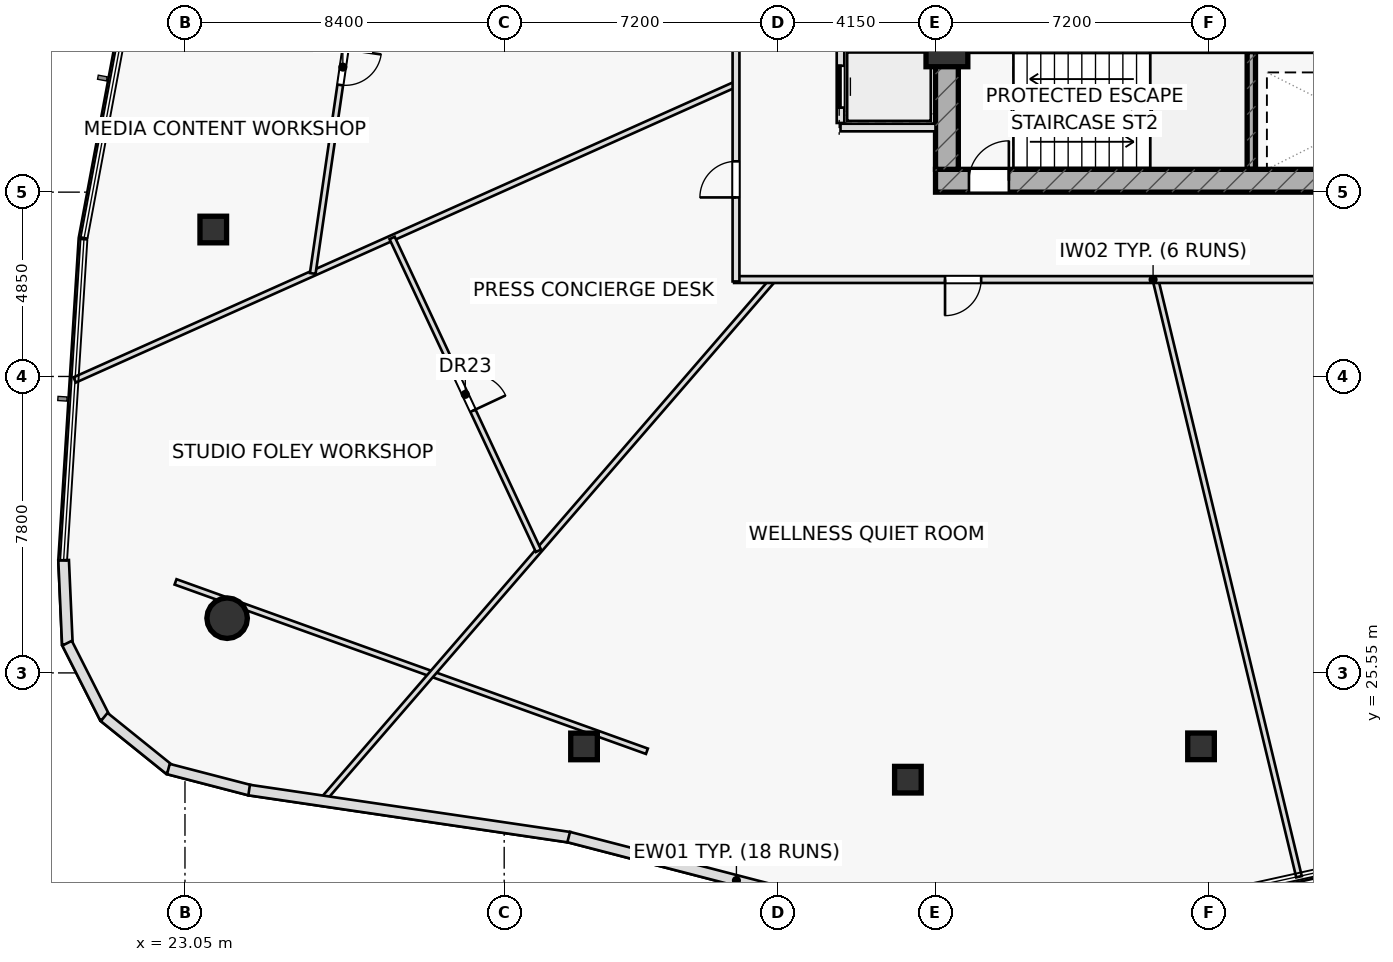
"""IFC4 building model, lengths in metres.
Left out: names, types, materials, properties, quantities, classifications, styles, units other than length and angle.
Written with IfcOpenShell. Run it as: python <this file> out.ifc"""

import sys

from ifc_helpers import new_model, si_unit, direction, frame, frame_2d, origin, origin_2d, place, context, subcontext, project, spatial, rectangle, hollow_rectangle, hollow_circle, extrude, element, fill, save


model = new_model("IFC4")
c1 = context("Model", 3, precision=1e-05, world=origin(), true_north=direction((0.0, 1.0)))
c2 = subcontext(c1, "Body", "Model", "MODEL_VIEW")
j1 = project(units=[si_unit("LENGTHUNIT", "METRE"), si_unit("PLANEANGLEUNIT", "RADIAN")], contexts=[c1])
p1 = place(None, origin())
s1 = spatial("IfcSite", under=j1, at=p1, CompositionType="ELEMENT")
p2 = place(p1, origin())
s2 = spatial("IfcBuilding", under=s1, at=p2, CompositionType="ELEMENT")
p3 = place(p2, frame((0.0, 0.0, 62.7)))
s3 = spatial("IfcBuildingStorey", under=s2, at=p3, CompositionType="ELEMENT", Elevation=62.7)
p4 = place(p3, frame((51.11, 38.8, 0.0), z_axis=(0.0, 0.0, 1.0), x_axis=(0.0, 1.0, 0.0)))
e1 = element("IfcWall", 1, at=p4, inside=s3, PredefinedType="SHEAR", context=c2, shape_type="SweptSolid", body=[
    extrude(rectangle(XDim=3.1, YDim=0.22, at=frame_2d((1.55, 0.0))), origin(), (0.0, 0.0, 1.0), 3.6),
])
p5 = place(p3, frame((42.8, 38.5, 0.0), z_axis=(0.0, 0.0, 1.0), x_axis=(1.0, 0.0, 0.0)))
e2 = element("IfcWall", 2, at=p5, inside=s3, PredefinedType="SHEAR", context=c2, shape_type="SweptSolid", body=[
    extrude(rectangle(XDim=14.4, YDim=0.6, at=frame_2d((7.2, 0.0))), origin(), (0.0, 0.0, 1.0), 3.6),
])
p6 = place(p5, frame((0.88, 0.0, 0.0)))
e3 = element("IfcOpeningElement", 3, at=p6, cuts=e2, PredefinedType="OPENING", context=c2, shape_type="SweptSolid", body=[
    extrude(rectangle(XDim=1.05, YDim=2.2, at=frame_2d((0.525, 1.1))), frame((0.0, 0.31, 0.0), z_axis=(0.0, -1.0, 0.0), x_axis=(1.0, 0.0, 0.0)), (0.0, 0.0, 1.0), 0.62),
])
p7 = place(p3, frame((43.1, 38.8, 0.0), z_axis=(0.0, 0.0, 1.0), x_axis=(0.0, 1.0, 0.0)))
e4 = element("IfcWall", 4, at=p7, inside=s3, PredefinedType="SHEAR", context=c2, shape_type="SweptSolid", body=[
    extrude(rectangle(XDim=12.4, YDim=0.6, at=frame_2d((6.2, 0.0))), origin(), (0.0, 0.0, 1.0), 3.6),
])
p8 = place(p3, frame((43.1, 42.05, 0.0), z_axis=(0.0, 0.0, 1.0), x_axis=(1.0, 0.0, 0.0)))
e5 = element("IfcColumn", 5, at=p8, inside=s3, PredefinedType="COLUMN", context=c2, shape_type="SweptSolid", body=[
    extrude(rectangle(XDim=1.1, YDim=1.1, at=origin_2d()), origin(), (0.0, 0.0, 1.0), 3.6),
])
p9 = place(p3, frame((23.795, 37.216, 0.0), z_axis=(0.0, 0.0, 1.0), x_axis=(1.0, 0.0, 0.0)))
e6 = element("IfcColumn", 6, at=p9, inside=s3, PredefinedType="COLUMN", context=c2, shape_type="SweptSolid", body=[
    extrude(hollow_rectangle(XDim=0.7, YDim=0.7, WallThickness=0.04, at=origin_2d()), origin(), (0.0, 0.0, 1.0), 3.6),
])
p10 = place(p3, frame((24.159, 26.99, 0.0), z_axis=(0.0, 0.0, 1.0), x_axis=(1.0, 0.0, 0.0)))
e7 = element("IfcColumn", 7, at=p10, inside=s3, PredefinedType="COLUMN", context=c2, shape_type="SweptSolid", body=[
    extrude(hollow_circle(Radius=0.533, WallThickness=0.045, at=origin_2d()), origin(), (0.0, 0.0, 1.0), 3.6),
])
for number, where, z_axis, x_axis in (
    (8, (33.551, 23.615, 0.0), (0.0, 0.0, 1.0), (1.0, 0.0, 0.0)),
    (9, (42.073, 22.74, 0.0), (0.0, 0.0, 1.0), (1.0, 0.0, 0.0)),
    (10, (49.787, 23.618, 0.0), (0.0, 0.0, 1.0), (1.0, 0.0, 0.0)),
):
    element("IfcColumn", number, at=place(p3, frame(where, z_axis=z_axis, x_axis=x_axis)), inside=s3, PredefinedType="COLUMN", context=c2, shape_type="SweptSolid", body=[
        extrude(hollow_rectangle(XDim=0.7, YDim=0.7, WallThickness=0.04, at=origin_2d()), origin(), (0.0, 0.0, 1.0), 3.6),
    ])
p11 = place(p3, frame((40.3, 39.9, 0.0), z_axis=(0.0, 0.0, 1.0), x_axis=(1.0, 0.0, 0.0)))
e11 = element("IfcWall", 11, at=p11, inside=s3, PredefinedType="PARTITIONING", context=c2, shape_type="SweptSolid", body=[
    extrude(rectangle(XDim=2.5, YDim=0.2, at=frame_2d((1.25, 0.0))), origin(), (0.0, 0.0, 1.0), 3.6),
])
p12 = place(p3, frame((22.802, 27.945, 0.0), z_axis=(0.0, 0.0, 1.0), x_axis=(0.941102349209, -0.338121824662, 0.0)))
e12 = element("IfcWall", 12, at=p12, inside=s3, PredefinedType="PARTITIONING", context=c2, shape_type="SweptSolid", body=[
    extrude(rectangle(XDim=13.18, YDim=0.15, at=frame_2d((6.59, 0.0))), origin(), (0.0, 0.0, 1.0), 2.975),
])
p13 = place(p3, frame((37.55, 41.042, 0.0), z_axis=(0.0, 0.0, 1.0), x_axis=(-0.912860583098, -0.408271424211, 0.0)))
e13 = element("IfcWall", 13, at=p13, inside=s3, PredefinedType="PARTITIONING", context=c2, shape_type="SweptSolid", body=[
    extrude(rectangle(XDim=19.064, YDim=0.15, at=frame_2d((9.532, 0.0))), origin(), (0.0, 0.0, 1.0), 2.975),
])
p14 = place(p3, frame((38.526, 35.9, 0.0), z_axis=(0.0, 0.0, 1.0), x_axis=(-0.654326006544, -0.75621258728, 0.0)))
e14 = element("IfcWall", 14, at=p14, inside=s3, PredefinedType="PARTITIONING", context=c2, shape_type="SweptSolid", body=[
    extrude(rectangle(XDim=18.149, YDim=0.15, at=frame_2d((9.074, 0.0))), origin(), (0.0, 0.0, 1.0), 2.975),
])
p15 = place(p3, frame((48.588, 35.9, 0.0), z_axis=(0.0, 0.0, 1.0), x_axis=(0.233735732541, -0.972300163187, 0.0)))
e15 = element("IfcWall", 15, at=p15, inside=s3, PredefinedType="PARTITIONING", context=c2, shape_type="SweptSolid", body=[
    extrude(rectangle(XDim=16.162, YDim=0.15, at=frame_2d((8.081, 0.0))), origin(), (0.0, 0.0, 1.0), 3.025),
])
p16 = place(p3, frame((27.996, 46.919, 0.0), z_axis=(0.0, 0.0, 1.0), x_axis=(-0.144345470149, -0.989527354472, 0.0)))
e16 = element("IfcWall", 16, at=p16, inside=s3, PredefinedType="PARTITIONING", context=c2, shape_type="SweptSolid", body=[
    extrude(rectangle(XDim=10.974, YDim=0.15, at=frame_2d((5.487, 0.0))), origin(), (0.0, 0.0, 1.0), 2.975),
])
p17 = place(p16, frame((5.012, 0.0, 0.0)))
e17 = element("IfcOpeningElement", 17, at=p17, cuts=e16, PredefinedType="OPENING", context=c2, shape_type="SweptSolid", body=[
    extrude(rectangle(XDim=0.95, YDim=2.05, at=frame_2d((0.475, 1.025))), frame((0.0, 0.085, 0.0), z_axis=(0.0, -1.0, 0.0), x_axis=(1.0, 0.0, 0.0)), (0.0, 0.0, 1.0), 0.17),
])
p18 = place(p3, frame((28.501, 36.995, 0.0), z_axis=(0.0, 0.0, 1.0), x_axis=(0.423698619108, -0.905803223756, 0.0)))
e18 = element("IfcWall", 18, at=p18, inside=s3, PredefinedType="PARTITIONING", context=c2, shape_type="SweptSolid", body=[
    extrude(rectangle(XDim=9.087, YDim=0.15, at=frame_2d((4.544, 0.0))), origin(), (0.0, 0.0, 1.0), 2.975),
])
p19 = place(p18, frame((4.069, 0.0, 0.0)))
e19 = element("IfcOpeningElement", 19, at=p19, cuts=e18, PredefinedType="OPENING", context=c2, shape_type="SweptSolid", body=[
    extrude(rectangle(XDim=0.95, YDim=2.05, at=frame_2d((0.475, 1.025))), frame((0.0, 0.085, 0.0), z_axis=(0.0, -1.0, 0.0), x_axis=(1.0, 0.0, 0.0)), (0.0, 0.0, 1.0), 0.17),
])
p20 = place(p3, frame((59.55, 35.9, 0.0), z_axis=(0.0, 0.0, 1.0), x_axis=(-1.0, 0.0, 0.0)))
e20 = element("IfcWall", 20, at=p20, inside=s3, PredefinedType="PARTITIONING", context=c2, shape_type="SweptSolid", body=[
    extrude(rectangle(XDim=22.05, YDim=0.18, at=frame_2d((11.025, 0.0))), origin(), (0.0, 0.0, 1.0), 2.975),
])
p21 = place(p20, frame((5.11, 0.0, 0.0)))
e21 = element("IfcOpeningElement", 21, at=p21, cuts=e20, PredefinedType="OPENING", context=c2, shape_type="SweptSolid", body=[
    extrude(rectangle(XDim=0.95, YDim=2.05, at=frame_2d((0.475, 1.025))), frame((0.0, 0.1, 0.0), z_axis=(0.0, -1.0, 0.0), x_axis=(1.0, 0.0, 0.0)), (0.0, 0.0, 1.0), 0.2),
])
p22 = place(p20, frame((15.55, 0.0, 0.0)))
e22 = element("IfcOpeningElement", 22, at=p22, cuts=e20, PredefinedType="OPENING", context=c2, shape_type="SweptSolid", body=[
    extrude(rectangle(XDim=0.95, YDim=2.05, at=frame_2d((0.475, 1.025))), frame((0.0, 0.1, 0.0), z_axis=(0.0, -1.0, 0.0), x_axis=(1.0, 0.0, 0.0)), (0.0, 0.0, 1.0), 0.2),
])
p23 = place(p3, frame((37.55, 35.85, 0.0), z_axis=(0.0, 0.0, 1.0), x_axis=(0.0, 1.0, 0.0)))
e23 = element("IfcWall", 23, at=p23, inside=s3, PredefinedType="PARTITIONING", context=c2, shape_type="SweptSolid", body=[
    extrude(rectangle(XDim=12.65, YDim=0.18, at=frame_2d((6.325, 0.0))), origin(), (0.0, 0.0, 1.0), 2.975),
])
p24 = place(p23, frame((2.211, 0.0, 0.0)))
e24 = element("IfcOpeningElement", 24, at=p24, cuts=e23, PredefinedType="OPENING", context=c2, shape_type="SweptSolid", body=[
    extrude(rectangle(XDim=0.95, YDim=2.05, at=frame_2d((0.475, 1.025))), frame((0.0, 0.1, 0.0), z_axis=(0.0, -1.0, 0.0), x_axis=(1.0, 0.0, 0.0)), (0.0, 0.0, 1.0), 0.2),
])
p25 = place(p23, frame((7.143, 0.0, 0.0)))
e25 = element("IfcOpeningElement", 25, at=p25, cuts=e23, PredefinedType="OPENING", context=c2, shape_type="SweptSolid", body=[
    extrude(rectangle(XDim=0.95, YDim=2.05, at=frame_2d((0.475, 1.025))), frame((0.0, 0.1, 0.0), z_axis=(0.0, -1.0, 0.0), x_axis=(1.0, 0.0, 0.0)), (0.0, 0.0, 1.0), 0.2),
])
p26 = place(p23, frame((10.774, 0.0, 0.0)))
e26 = element("IfcOpeningElement", 26, at=p26, cuts=e23, PredefinedType="OPENING", context=c2, shape_type="SweptSolid", body=[
    extrude(rectangle(XDim=0.95, YDim=2.05, at=frame_2d((0.475, 1.025))), frame((0.0, 0.1, 0.0), z_axis=(0.0, -1.0, 0.0), x_axis=(1.0, 0.0, 0.0)), (0.0, 0.0, 1.0), 0.2),
])
p27 = place(p3, frame((19.857, 28.515, 0.0), z_axis=(0.0, 0.0, 1.0), x_axis=(0.044432401991, -0.999012393143, 0.0)))
e27 = element("IfcWall", 27, at=p27, inside=s3, PredefinedType="STANDARD", context=c2, shape_type="SweptSolid", body=[
    extrude(rectangle(XDim=2.214, YDim=0.28, at=frame_2d((1.107, 0.0))), origin(), (0.0, 0.0, 1.0), 3.6),
])
for number, where, z_axis, x_axis in (
    (28, (19.948, 26.331, 0.0), (0.0, 0.0, 1.0), (0.452, -0.892, 0.0)),
    (29, (20.924, 24.389, 0.0), (0.0, 0.0, 1.0), (0.779, -0.627, 0.0)),
):
    element("IfcWall", number, at=place(p3, frame(where, z_axis=z_axis, x_axis=x_axis)), inside=s3, PredefinedType="STANDARD", context=c2, shape_type="SweptSolid", body=[
        extrude(rectangle(XDim=2.203, YDim=0.28, at=frame_2d((1.101, 0.0))), origin(), (0.0, 0.0, 1.0), 3.6),
    ])
p28 = place(p3, frame((22.613, 23.021, 0.0), z_axis=(0.0, 0.0, 1.0), x_axis=(0.967909001879, -0.251300943258, 0.0)))
e30 = element("IfcWall", 30, at=p28, inside=s3, PredefinedType="STANDARD", context=c2, shape_type="SweptSolid", body=[
    extrude(rectangle(XDim=2.226, YDim=0.28, at=frame_2d((1.113, 0.0))), origin(), (0.0, 0.0, 1.0), 3.6),
])
p29 = place(p3, frame((24.738, 22.467, 0.0), z_axis=(0.0, 0.0, 1.0), x_axis=(0.989330031973, -0.145691756242, 0.0)))
e31 = element("IfcWall", 31, at=p29, inside=s3, PredefinedType="STANDARD", context=c2, shape_type="SweptSolid", body=[
    extrude(rectangle(XDim=8.53, YDim=0.28, at=frame_2d((4.265, 0.0))), origin(), (0.0, 0.0, 1.0), 3.6),
])
p30 = place(p3, frame((33.147, 21.231, 0.0), z_axis=(0.0, 0.0, 1.0), x_axis=(0.968060465232, -0.250716843579, 0.0)))
e32 = element("IfcWall", 32, at=p30, inside=s3, PredefinedType="STANDARD", context=c2, shape_type="SweptSolid", body=[
    extrude(rectangle(XDim=9.118, YDim=0.28, at=frame_2d((4.559, 0.0))), origin(), (0.0, 0.0, 1.0), 3.6),
])
p31 = place(p3, frame((40.3, 40.02, 0.0), z_axis=(0.0, 0.0, 1.0), x_axis=(0.0, 1.0, 0.0)))
e33 = element("IfcWall", 33, at=p31, inside=s3, PredefinedType="PARTITIONING", context=c2, shape_type="SweptSolid", body=[
    extrude(rectangle(XDim=8.21, YDim=0.2, at=frame_2d((4.105, 0.0))), origin(), (0.0, 0.0, 1.0), 3.6),
])
p32 = place(p31, frame((0.405, 0.0, 0.0)))
e34 = element("IfcOpeningElement", 34, at=p32, cuts=e33, PredefinedType="OPENING", context=c2, shape_type="SweptSolid", body=[
    extrude(rectangle(XDim=1.1, YDim=2.15, at=frame_2d((0.55, 1.075))), frame((0.0, 0.11, 0.0), z_axis=(0.0, -1.0, 0.0), x_axis=(1.0, 0.0, 0.0)), (0.0, 0.0, 1.0), 0.22),
])
p33 = place(p31, frame((2.505, 0.0, 0.0)))
e35 = element("IfcOpeningElement", 35, at=p33, cuts=e33, PredefinedType="OPENING", context=c2, shape_type="SweptSolid", body=[
    extrude(rectangle(XDim=1.1, YDim=2.15, at=frame_2d((0.55, 1.075))), frame((0.0, 0.11, 0.0), z_axis=(0.0, -1.0, 0.0), x_axis=(1.0, 0.0, 0.0)), (0.0, 0.0, 1.0), 0.22),
])
p34 = place(p31, frame((4.605, 0.0, 0.0)))
e36 = element("IfcOpeningElement", 36, at=p34, cuts=e33, PredefinedType="OPENING", context=c2, shape_type="SweptSolid", body=[
    extrude(rectangle(XDim=1.1, YDim=2.15, at=frame_2d((0.55, 1.075))), frame((0.0, 0.11, 0.0), z_axis=(0.0, -1.0, 0.0), x_axis=(1.0, 0.0, 0.0)), (0.0, 0.0, 1.0), 0.22),
])
p35 = place(p31, frame((6.705, 0.0, 0.0)))
e37 = element("IfcOpeningElement", 37, at=p35, cuts=e33, PredefinedType="OPENING", context=c2, shape_type="SweptSolid", body=[
    extrude(rectangle(XDim=1.1, YDim=2.15, at=frame_2d((0.55, 1.075))), frame((0.0, 0.11, 0.0), z_axis=(0.0, -1.0, 0.0), x_axis=(1.0, 0.0, 0.0)), (0.0, 0.0, 1.0), 0.22),
])
p36 = place(p6, origin())
e38 = element("IfcDoor", 38, at=p36, inside=s3, OperationType="SINGLE_SWING_RIGHT", PredefinedType="DOOR", context=c2, shape_type="SweptSolid", body=[
    extrude(rectangle(XDim=1.05, YDim=2.2, at=frame_2d((0.525, 1.1))), frame((0.0, 0.025, 0.0), z_axis=(0.0, -1.0, 0.0), x_axis=(1.0, 0.0, 0.0)), (0.0, 0.0, 1.0), 0.05),
])
fill(e3, e38)
p37 = place(p17, origin())
e39 = element("IfcDoor", 39, at=p37, inside=s3, OperationType="SINGLE_SWING_LEFT", PredefinedType="DOOR", context=c2, shape_type="SweptSolid", body=[
    extrude(rectangle(XDim=0.95, YDim=2.05, at=frame_2d((0.475, 1.025))), frame((0.0, 0.025, 0.0), z_axis=(0.0, -1.0, 0.0), x_axis=(1.0, 0.0, 0.0)), (0.0, 0.0, 1.0), 0.05),
])
fill(e17, e39)
p38 = place(p19, origin())
e40 = element("IfcDoor", 40, at=p38, inside=s3, OperationType="SINGLE_SWING_RIGHT", PredefinedType="DOOR", context=c2, shape_type="SweptSolid", body=[
    extrude(rectangle(XDim=0.95, YDim=2.05, at=frame_2d((0.475, 1.025))), frame((0.0, 0.025, 0.0), z_axis=(0.0, -1.0, 0.0), x_axis=(1.0, 0.0, 0.0)), (0.0, 0.0, 1.0), 0.05),
])
fill(e19, e40)
p39 = place(p22, origin())
e41 = element("IfcDoor", 41, at=p39, inside=s3, OperationType="SINGLE_SWING_RIGHT", PredefinedType="DOOR", context=c2, shape_type="SweptSolid", body=[
    extrude(rectangle(XDim=0.95, YDim=2.05, at=frame_2d((0.475, 1.025))), frame((0.0, 0.025, 0.0), z_axis=(0.0, -1.0, 0.0), x_axis=(1.0, 0.0, 0.0)), (0.0, 0.0, 1.0), 0.05),
])
fill(e22, e41)
p40 = place(p24, origin())
e42 = element("IfcDoor", 42, at=p40, inside=s3, OperationType="SINGLE_SWING_LEFT", PredefinedType="DOOR", context=c2, shape_type="SweptSolid", body=[
    extrude(rectangle(XDim=0.95, YDim=2.05, at=frame_2d((0.475, 1.025))), frame((0.0, 0.025, 0.0), z_axis=(0.0, -1.0, 0.0), x_axis=(1.0, 0.0, 0.0)), (0.0, 0.0, 1.0), 0.05),
])
fill(e24, e42)
p41 = place(p32, origin())
e43 = element("IfcDoor", 43, at=p41, inside=s3, OperationType="SLIDING_TO_LEFT", PredefinedType="DOOR", context=c2, shape_type="SweptSolid", body=[
    extrude(rectangle(XDim=1.1, YDim=2.15, at=frame_2d((0.55, 1.075))), frame((0.0, 0.025, 0.0), z_axis=(0.0, -1.0, 0.0), x_axis=(1.0, 0.0, 0.0)), (0.0, 0.0, 1.0), 0.05),
])
fill(e34, e43)
save(model, sys.argv[1])
